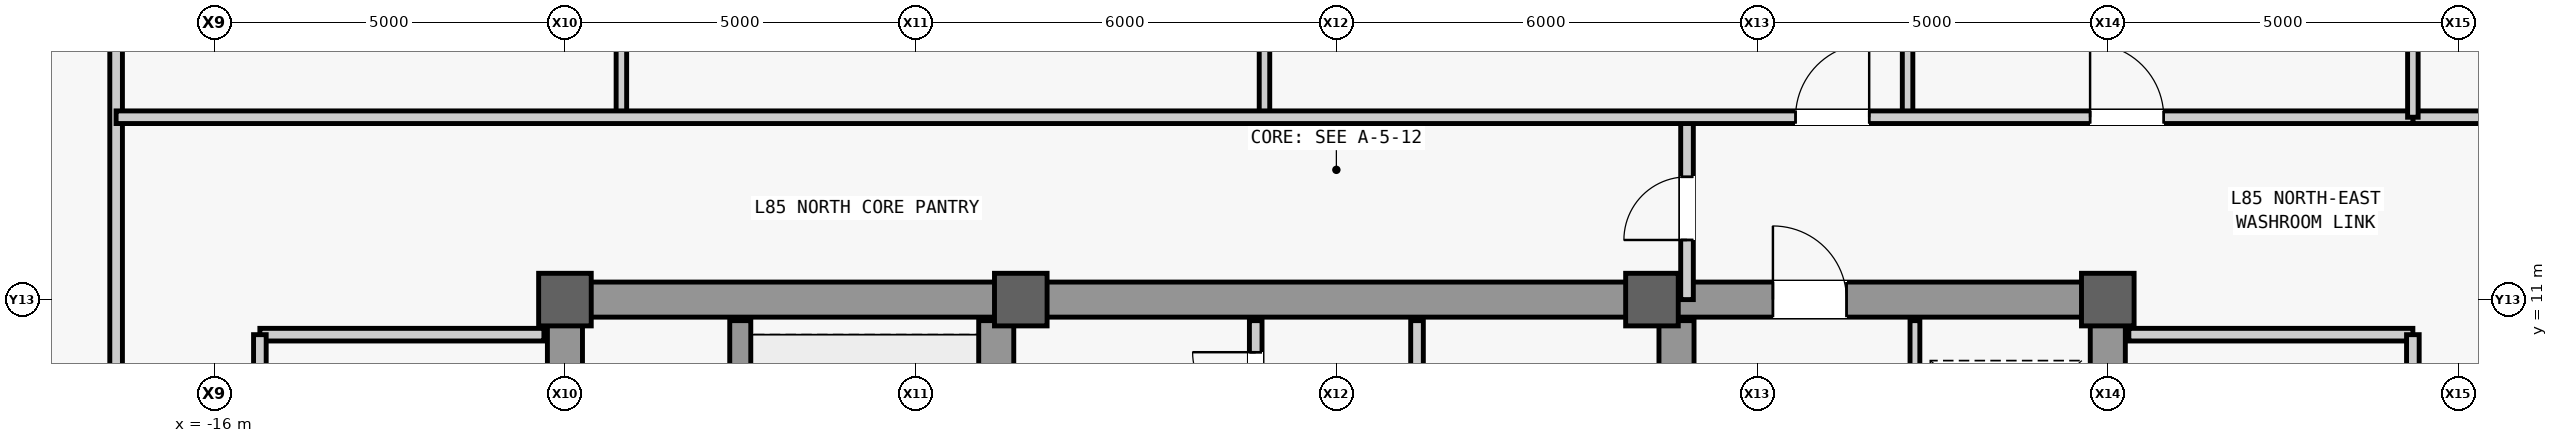
"""IFC4 building model, lengths in metres.
Left out: names, types, materials, properties, quantities, classifications, styles, units other than length and angle.
Written with IfcOpenShell. Run it as: python <this file> out.ifc"""

import sys

from ifc_helpers import new_model, si_unit, direction, frame, frame_2d, origin, origin_2d, place, context, subcontext, project, spatial, rectangle, extrude, source, transform, mapped, element, fill, save


model = new_model("IFC4")
c1 = context("Model", 3, precision=1e-05, world=origin(), true_north=direction((0.0, 1.0)))
c2 = subcontext(c1, "Body", "Model", "MODEL_VIEW")
j1 = project(units=[si_unit("LENGTHUNIT", "METRE"), si_unit("PLANEANGLEUNIT", "RADIAN")], contexts=[c1])
p1 = place(None, origin())
s1 = spatial("IfcSite", under=j1, at=p1, CompositionType="ELEMENT")
p2 = place(p1, origin())
s2 = spatial("IfcBuilding", under=s1, at=p2, CompositionType="ELEMENT")
p3 = place(p2, frame((0.0, 0.0, 358.3)))
s3 = spatial("IfcBuildingStorey", under=s2, at=p3, CompositionType="ELEMENT", Elevation=358.3)
m1 = source(origin(), c2, "Body", "SweptSolid", [
    extrude(rectangle(XDim=22.0, YDim=0.5, at=frame_2d((11.0, 0.0))), origin(), (0.0, 0.0, 1.0), 3.74),
])
p4 = place(p3, frame((-11.0, -11.0, 0.0), z_axis=(0.0, 0.0, 1.0), x_axis=(0.0, 1.0, 0.0)))
e1 = element("IfcWall", 1, at=p4, inside=s3, PredefinedType="SHEAR", context=c2, shape_type="MappedRepresentation", body=[
    mapped(m1, transform((0.0, 0.0, 0.0), scale=1.0)),
])
m2 = source(origin(), c2, "Body", "SweptSolid", [
    extrude(rectangle(XDim=1.1, YDim=2.2, at=frame_2d((0.55, 1.1))), frame((0.0, 0.26, 0.0), z_axis=(0.0, -1.0, 0.0), x_axis=(1.0, 0.0, 0.0)), (0.0, 0.0, 1.0), 0.52),
])
p5 = place(p4, frame((0.8, 0.0, 0.0)))
e2 = element("IfcOpeningElement", 2, at=p5, cuts=e1, PredefinedType="OPENING", context=c2, shape_type="MappedRepresentation", body=[
    mapped(m2, transform((0.0, 0.0, 0.0), scale=1.0)),
])
p6 = place(p4, frame((12.5, 0.0, 0.0)))
e3 = element("IfcOpeningElement", 3, at=p6, cuts=e1, PredefinedType="OPENING", context=c2, shape_type="MappedRepresentation", body=[
    mapped(m2, transform((0.0, 0.0, 0.0), scale=1.0)),
])
m3 = source(origin(), c2, "Body", "SweptSolid", [
    extrude(rectangle(XDim=0.9, YDim=2.15, at=frame_2d((0.45, 1.075))), frame((0.0, 0.26, 0.0), z_axis=(0.0, -1.0, 0.0), x_axis=(1.0, 0.0, 0.0)), (0.0, 0.0, 1.0), 0.52),
])
p7 = place(p4, frame((6.2, 0.0, 0.0)))
e4 = element("IfcOpeningElement", 4, at=p7, cuts=e1, PredefinedType="OPENING", context=c2, shape_type="MappedRepresentation", body=[
    mapped(m3, transform((0.0, 0.0, 0.0), scale=1.0)),
])
p8 = place(p4, frame((8.525, 0.0, 0.0)))
e5 = element("IfcOpeningElement", 5, at=p8, cuts=e1, PredefinedType="OPENING", context=c2, shape_type="MappedRepresentation", body=[
    mapped(m3, transform((0.0, 0.0, 0.0), scale=1.0)),
])
m4 = source(origin(), c2, "Body", "SweptSolid", [
    extrude(rectangle(XDim=1.2, YDim=2.3, at=frame_2d((0.6, 1.15))), frame((0.0, 0.26, 0.0), z_axis=(0.0, -1.0, 0.0), x_axis=(1.0, 0.0, 0.0)), (0.0, 0.0, 1.0), 0.52),
])
p9 = place(p4, frame((14.6, 0.0, 0.0)))
e6 = element("IfcOpeningElement", 6, at=p9, cuts=e1, PredefinedType="OPENING", context=c2, shape_type="MappedRepresentation", body=[
    mapped(m4, transform((0.0, 0.0, 0.0), scale=1.0)),
])
p10 = place(p4, frame((18.2, 0.0, 0.0)))
e7 = element("IfcOpeningElement", 7, at=p10, cuts=e1, PredefinedType="OPENING", context=c2, shape_type="MappedRepresentation", body=[
    mapped(m4, transform((0.0, 0.0, 0.0), scale=1.0)),
])
m5 = source(origin(), c2, "Body", "SweptSolid", [
    extrude(rectangle(XDim=1.3, YDim=2.3, at=frame_2d((0.65, 1.15))), frame((0.0, 0.26, 0.0), z_axis=(0.0, -1.0, 0.0), x_axis=(1.0, 0.0, 0.0)), (0.0, 0.0, 1.0), 0.52),
])
p11 = place(p4, frame((2.7, 0.0, 0.0)))
e8 = element("IfcOpeningElement", 8, at=p11, cuts=e1, PredefinedType="OPENING", context=c2, shape_type="MappedRepresentation", body=[
    mapped(m5, transform((0.0, 0.0, 0.0), scale=1.0)),
])
p12 = place(p3, frame((11.0, -11.0, 0.0), z_axis=(0.0, 0.0, 1.0), x_axis=(0.0, 1.0, 0.0)))
e9 = element("IfcWall", 9, at=p12, inside=s3, PredefinedType="SHEAR", context=c2, shape_type="MappedRepresentation", body=[
    mapped(m1, transform((0.0, 0.0, 0.0), scale=1.0)),
])
p13 = place(p12, frame((0.8, 0.0, 0.0)))
e10 = element("IfcOpeningElement", 10, at=p13, cuts=e9, PredefinedType="OPENING", context=c2, shape_type="MappedRepresentation", body=[
    mapped(m2, transform((0.0, 0.0, 0.0), scale=1.0)),
])
p14 = place(p12, frame((6.2, 0.0, 0.0)))
e11 = element("IfcOpeningElement", 11, at=p14, cuts=e9, PredefinedType="OPENING", context=c2, shape_type="MappedRepresentation", body=[
    mapped(m3, transform((0.0, 0.0, 0.0), scale=1.0)),
])
p15 = place(p12, frame((8.525, 0.0, 0.0)))
e12 = element("IfcOpeningElement", 12, at=p15, cuts=e9, PredefinedType="OPENING", context=c2, shape_type="MappedRepresentation", body=[
    mapped(m3, transform((0.0, 0.0, 0.0), scale=1.0)),
])
p16 = place(p12, frame((17.6, 0.0, 0.0)))
e13 = element("IfcOpeningElement", 13, at=p16, cuts=e9, PredefinedType="OPENING", context=c2, shape_type="MappedRepresentation", body=[
    mapped(m4, transform((0.0, 0.0, 0.0), scale=1.0)),
])
p17 = place(p12, frame((19.6, 0.0, 0.0)))
e14 = element("IfcOpeningElement", 14, at=p17, cuts=e9, PredefinedType="OPENING", context=c2, shape_type="MappedRepresentation", body=[
    mapped(m4, transform((0.0, 0.0, 0.0), scale=1.0)),
])
p18 = place(p12, frame((2.7, 0.0, 0.0)))
e15 = element("IfcOpeningElement", 15, at=p18, cuts=e9, PredefinedType="OPENING", context=c2, shape_type="MappedRepresentation", body=[
    mapped(m5, transform((0.0, 0.0, 0.0), scale=1.0)),
])
p19 = place(p12, frame((13.35, 0.0, 0.0)))
e16 = element("IfcOpeningElement", 16, at=p19, cuts=e9, PredefinedType="OPENING", context=c2, shape_type="MappedRepresentation", body=[
    mapped(m5, transform((0.0, 0.0, 0.0), scale=1.0)),
])
m6 = source(origin(), c2, "Body", "SweptSolid", [
    extrude(rectangle(XDim=21.4, YDim=0.5, at=frame_2d((10.7, 0.0))), origin(), (0.0, 0.0, 1.0), 3.74),
])
for number, where, z_axis, x_axis in (
    (17, (-4.85, -10.7, 0.0), (0.0, 0.0, 1.0), (0.0, 1.0, 0.0)),
    (18, (4.85, -10.7, 0.0), (0.0, 0.0, 1.0), (0.0, 1.0, 0.0)),
):
    element("IfcWall", number, at=place(p3, frame(where, z_axis=z_axis, x_axis=x_axis)), inside=s3, PredefinedType="SHEAR", context=c2, shape_type="MappedRepresentation", body=[
        mapped(m6, transform((0.0, 0.0, 0.0), scale=1.0)),
    ])
m7 = source(origin(), c2, "Body", "SweptSolid", [
    extrude(rectangle(XDim=5.9, YDim=0.5, at=frame_2d((2.95, 0.0))), origin(), (0.0, 0.0, 1.0), 3.74),
])
p20 = place(p3, frame((-10.75, 11.0, 0.0), z_axis=(0.0, 0.0, 1.0), x_axis=(1.0, 0.0, 0.0)))
e19 = element("IfcWall", 19, at=p20, inside=s3, PredefinedType="SHEAR", context=c2, shape_type="MappedRepresentation", body=[
    mapped(m7, transform((0.0, 0.0, 0.0), scale=1.0)),
])
p21 = place(p3, frame((4.85, 11.0, 0.0), z_axis=(0.0, 0.0, 1.0), x_axis=(1.0, 0.0, 0.0)))
e20 = element("IfcWall", 20, at=p21, inside=s3, PredefinedType="SHEAR", context=c2, shape_type="MappedRepresentation", body=[
    mapped(m7, transform((0.0, 0.0, 0.0), scale=1.0)),
])
m8 = source(origin(), c2, "Body", "SweptSolid", [
    extrude(rectangle(XDim=1.05, YDim=2.2, at=frame_2d((0.525, 1.1))), frame((0.0, 0.26, 0.0), z_axis=(0.0, -1.0, 0.0), x_axis=(1.0, 0.0, 0.0)), (0.0, 0.0, 1.0), 0.52),
])
p22 = place(p21, frame((1.375, 0.0, 0.0)))
e21 = element("IfcOpeningElement", 21, at=p22, cuts=e20, PredefinedType="OPENING", context=c2, shape_type="MappedRepresentation", body=[
    mapped(m8, transform((0.0, 0.0, 0.0), scale=1.0)),
])
m9 = source(origin(), c2, "Body", "SweptSolid", [
    extrude(rectangle(XDim=9.2, YDim=0.5, at=frame_2d((4.6, 0.0))), origin(), (0.0, 0.0, 1.0), 3.74),
])
p23 = place(p3, frame((-4.6, 11.0, 0.0), z_axis=(0.0, 0.0, 1.0), x_axis=(1.0, 0.0, 0.0)))
e22 = element("IfcWall", 22, at=p23, inside=s3, PredefinedType="SHEAR", context=c2, shape_type="MappedRepresentation", body=[
    mapped(m9, transform((0.0, 0.0, 0.0), scale=1.0)),
])
m10 = source(origin(), c2, "Body", "SweptSolid", [
    extrude(rectangle(XDim=0.75, YDim=0.75, at=origin_2d()), origin(), (0.0, 0.0, 1.0), 4.0),
])
for number, where, z_axis, x_axis in (
    (23, (-11.0, 11.0, 0.0), (0.0, 0.0, 1.0), (1.0, 0.0, 0.0)),
    (24, (-4.5, 11.0, 0.0), (0.0, 0.0, 1.0), (1.0, 0.0, 0.0)),
    (25, (4.5, 11.0, 0.0), (0.0, 0.0, 1.0), (1.0, 0.0, 0.0)),
    (26, (11.0, 11.0, 0.0), (0.0, 0.0, 1.0), (1.0, 0.0, 0.0)),
):
    element("IfcColumn", number, at=place(p3, frame(where, z_axis=z_axis, x_axis=x_axis)), inside=s3, PredefinedType="COLUMN", context=c2, shape_type="MappedRepresentation", body=[
        mapped(m10, transform((0.0, 0.0, 0.0), scale=1.0)),
    ])
m11 = source(origin(), c2, "Body", "SweptSolid", [
    extrude(rectangle(XDim=7.75, YDim=0.3, at=frame_2d((3.875, 0.0))), origin(), (0.0, 0.0, 1.0), 3.74),
])
p24 = place(p3, frame((-8.5, 2.95, 0.0), z_axis=(0.0, 0.0, 1.0), x_axis=(0.0, 1.0, 0.0)))
e27 = element("IfcWall", 27, at=p24, inside=s3, PredefinedType="SHEAR", context=c2, shape_type="MappedRepresentation", body=[
    mapped(m11, transform((0.0, 0.0, 0.0), scale=1.0)),
])
m12 = source(origin(), c2, "Body", "SweptSolid", [
    extrude(rectangle(XDim=9.4, YDim=0.14, at=frame_2d((4.7, 0.0))), origin(), (0.0, 0.0, 1.0), 3.74),
])
p25 = place(p3, frame((8.25, 1.3, 0.0), z_axis=(0.0, 0.0, 1.0), x_axis=(0.0, 1.0, 0.0)))
e28 = element("IfcWall", 28, at=p25, inside=s3, PredefinedType="PARTITIONING", context=c2, shape_type="MappedRepresentation", body=[
    mapped(m12, transform((0.0, 0.0, 0.0), scale=1.0)),
])
m13 = source(origin(), c2, "Body", "SweptSolid", [
    extrude(rectangle(XDim=4.05, YDim=0.18, at=frame_2d((2.025, 0.0))), origin(), (0.0, 0.0, 1.0), 3.74),
])
p26 = place(p3, frame((-15.35, 10.5, 0.0), z_axis=(0.0, 0.0, 1.0), x_axis=(1.0, 0.0, 0.0)))
e29 = element("IfcWall", 29, at=p26, inside=s3, PredefinedType="PARTITIONING", context=c2, shape_type="MappedRepresentation", body=[
    mapped(m13, transform((0.0, 0.0, 0.0), scale=1.0)),
])
m14 = source(origin(), c2, "Body", "SweptSolid", [
    extrude(rectangle(XDim=16.6, YDim=0.18, at=frame_2d((8.3, 0.0))), origin(), (0.0, 0.0, 1.0), 3.74),
])
p27 = place(p3, frame((-15.35, -6.1, 0.0), z_axis=(0.0, 0.0, 1.0), x_axis=(0.0, 1.0, 0.0)))
e30 = element("IfcWall", 30, at=p27, inside=s3, PredefinedType="PARTITIONING", context=c2, shape_type="MappedRepresentation", body=[
    mapped(m14, transform((0.0, 0.0, 0.0), scale=1.0)),
])
m15 = source(origin(), c2, "Body", "SweptSolid", [
    extrude(rectangle(XDim=1.8, YDim=2.25, at=frame_2d((0.9, 1.125))), frame((0.0, 0.1, 0.0), z_axis=(0.0, -1.0, 0.0), x_axis=(1.0, 0.0, 0.0)), (0.0, 0.0, 1.0), 0.2),
])
p28 = place(p27, frame((2.7, 0.0, 0.0)))
e31 = element("IfcOpeningElement", 31, at=p28, cuts=e30, PredefinedType="OPENING", context=c2, shape_type="MappedRepresentation", body=[
    mapped(m15, transform((0.0, 0.0, 0.0), scale=1.0)),
])
p29 = place(p27, frame((11.0, 0.0, 0.0)))
e32 = element("IfcOpeningElement", 32, at=p29, cuts=e30, PredefinedType="OPENING", context=c2, shape_type="MappedRepresentation", body=[
    mapped(m15, transform((0.0, 0.0, 0.0), scale=1.0)),
])
p30 = place(p3, frame((11.3, 10.5, 0.0), z_axis=(0.0, 0.0, 1.0), x_axis=(1.0, 0.0, 0.0)))
e33 = element("IfcWall", 33, at=p30, inside=s3, PredefinedType="PARTITIONING", context=c2, shape_type="MappedRepresentation", body=[
    mapped(m13, transform((0.0, 0.0, 0.0), scale=1.0)),
])
p31 = place(p3, frame((15.35, -6.1, 0.0), z_axis=(0.0, 0.0, 1.0), x_axis=(0.0, 1.0, 0.0)))
e34 = element("IfcWall", 34, at=p31, inside=s3, PredefinedType="PARTITIONING", context=c2, shape_type="MappedRepresentation", body=[
    mapped(m14, transform((0.0, 0.0, 0.0), scale=1.0)),
])
p32 = place(p31, frame((2.7, 0.0, 0.0)))
e35 = element("IfcOpeningElement", 35, at=p32, cuts=e34, PredefinedType="OPENING", context=c2, shape_type="MappedRepresentation", body=[
    mapped(m15, transform((0.0, 0.0, 0.0), scale=1.0)),
])
p33 = place(p31, frame((13.0, 0.0, 0.0)))
e36 = element("IfcOpeningElement", 36, at=p33, cuts=e34, PredefinedType="OPENING", context=c2, shape_type="MappedRepresentation", body=[
    mapped(m15, transform((0.0, 0.0, 0.0), scale=1.0)),
])
m16 = source(origin(), c2, "Body", "SweptSolid", [
    extrude(rectangle(XDim=5.4, YDim=0.18, at=frame_2d((2.7, 0.0))), origin(), (0.0, 0.0, 1.0), 3.74),
])
p34 = place(p3, frame((-1.15, 5.3, 0.0), z_axis=(0.0, 0.0, 1.0), x_axis=(0.0, 1.0, 0.0)))
e37 = element("IfcWall", 37, at=p34, inside=s3, PredefinedType="PARTITIONING", context=c2, shape_type="MappedRepresentation", body=[
    mapped(m16, transform((0.0, 0.0, 0.0), scale=1.0)),
])
m17 = source(origin(), c2, "Body", "SweptSolid", [
    extrude(rectangle(XDim=0.9, YDim=2.15, at=frame_2d((0.45, 1.075))), frame((0.0, 0.1, 0.0), z_axis=(0.0, -1.0, 0.0), x_axis=(1.0, 0.0, 0.0)), (0.0, 0.0, 1.0), 0.2),
])
p35 = place(p34, frame((0.45, 0.0, 0.0)))
e38 = element("IfcOpeningElement", 38, at=p35, cuts=e37, PredefinedType="OPENING", context=c2, shape_type="MappedRepresentation", body=[
    mapped(m17, transform((0.0, 0.0, 0.0), scale=1.0)),
])
p36 = place(p34, frame((2.25, 0.0, 0.0)))
e39 = element("IfcOpeningElement", 39, at=p36, cuts=e37, PredefinedType="OPENING", context=c2, shape_type="MappedRepresentation", body=[
    mapped(m17, transform((0.0, 0.0, 0.0), scale=1.0)),
])
p37 = place(p34, frame((4.05, 0.0, 0.0)))
e40 = element("IfcOpeningElement", 40, at=p37, cuts=e37, PredefinedType="OPENING", context=c2, shape_type="MappedRepresentation", body=[
    mapped(m17, transform((0.0, 0.0, 0.0), scale=1.0)),
])
p38 = place(p3, frame((1.15, 5.3, 0.0), z_axis=(0.0, 0.0, 1.0), x_axis=(0.0, 1.0, 0.0)))
e41 = element("IfcWall", 41, at=p38, inside=s3, PredefinedType="PARTITIONING", context=c2, shape_type="MappedRepresentation", body=[
    mapped(m16, transform((0.0, 0.0, 0.0), scale=1.0)),
])
p39 = place(p38, frame((0.95, 0.0, 0.0)))
e42 = element("IfcOpeningElement", 42, at=p39, cuts=e41, PredefinedType="OPENING", context=c2, shape_type="MappedRepresentation", body=[
    mapped(m17, transform((0.0, 0.0, 0.0), scale=1.0)),
])
p40 = place(p38, frame((3.65, 0.0, 0.0)))
e43 = element("IfcOpeningElement", 43, at=p40, cuts=e41, PredefinedType="OPENING", context=c2, shape_type="MappedRepresentation", body=[
    mapped(m17, transform((0.0, 0.0, 0.0), scale=1.0)),
])
m18 = source(origin(), c2, "Body", "SweptSolid", [
    extrude(rectangle(XDim=8.4, YDim=0.18, at=frame_2d((4.2, 0.0))), origin(), (0.0, 0.0, 1.0), 3.74),
])
p41 = place(p3, frame((-17.4, 7.2, 0.0), z_axis=(0.0, 0.0, 1.0), x_axis=(0.0, 1.0, 0.0)))
e44 = element("IfcWall", 44, at=p41, inside=s3, PredefinedType="PARTITIONING", context=c2, shape_type="MappedRepresentation", body=[
    mapped(m18, transform((0.0, 0.0, 0.0), scale=1.0)),
])
m19 = source(origin(), c2, "Body", "SweptSolid", [
    extrude(rectangle(XDim=2.6, YDim=0.18, at=frame_2d((1.3, 0.0))), origin(), (0.0, 0.0, 1.0), 3.74),
])
p42 = place(p3, frame((5.0, 11.0, 0.0), z_axis=(0.0, 0.0, 1.0), x_axis=(0.0, 1.0, 0.0)))
e45 = element("IfcWall", 45, at=p42, inside=s3, PredefinedType="PARTITIONING", context=c2, shape_type="MappedRepresentation", body=[
    mapped(m19, transform((0.0, 0.0, 0.0), scale=1.0)),
])
p43 = place(p42, frame((0.85, 0.0, 0.0)))
e46 = element("IfcOpeningElement", 46, at=p43, cuts=e45, PredefinedType="OPENING", context=c2, shape_type="MappedRepresentation", body=[
    mapped(m17, transform((0.0, 0.0, 0.0), scale=1.0)),
])
m20 = source(origin(), c2, "Body", "SweptSolid", [
    extrude(rectangle(XDim=2.4, YDim=0.18, at=frame_2d((1.2, 0.0))), origin(), (0.0, 0.0, 1.0), 3.74),
])
p44 = place(p3, frame((15.35, 13.6, 0.0), z_axis=(0.0, 0.0, 1.0), x_axis=(1.0, 0.0, 0.0)))
e47 = element("IfcWall", 47, at=p44, inside=s3, PredefinedType="PARTITIONING", context=c2, shape_type="MappedRepresentation", body=[
    mapped(m20, transform((0.0, 0.0, 0.0), scale=1.0)),
])
m21 = source(origin(), c2, "Body", "SweptSolid", [
    extrude(rectangle(XDim=12.4, YDim=0.15, at=frame_2d((6.2, 0.0))), origin(), (0.0, 0.0, 1.0), 3.74),
])
p45 = place(p3, frame((-10.195, 13.6, 0.0), z_axis=(0.0, 0.0, 1.0), x_axis=(0.0, 1.0, 0.0)))
e48 = element("IfcWall", 48, at=p45, inside=s3, PredefinedType="PARTITIONING", context=c2, shape_type="MappedRepresentation", body=[
    mapped(m21, transform((0.0, 0.0, 0.0), scale=1.0)),
])
m22 = source(origin(), c2, "Body", "SweptSolid", [
    extrude(rectangle(XDim=0.95, YDim=2.15, at=frame_2d((0.475, 1.075))), frame((0.0, 0.085, 0.0), z_axis=(0.0, -1.0, 0.0), x_axis=(1.0, 0.0, 0.0)), (0.0, 0.0, 1.0), 0.17),
])
p46 = place(p45, frame((2.501, 0.0, 0.0)))
e49 = element("IfcOpeningElement", 49, at=p46, cuts=e48, PredefinedType="OPENING", context=c2, shape_type="MappedRepresentation", body=[
    mapped(m22, transform((0.0, 0.0, 0.0), scale=1.0)),
])
p47 = place(p3, frame((-1.025, 13.6, 0.0), z_axis=(0.0, 0.0, 1.0), x_axis=(0.0, 1.0, 0.0)))
e50 = element("IfcWall", 50, at=p47, inside=s3, PredefinedType="PARTITIONING", context=c2, shape_type="MappedRepresentation", body=[
    mapped(m21, transform((0.0, 0.0, 0.0), scale=1.0)),
])
p48 = place(p47, frame((2.501, 0.0, 0.0)))
e51 = element("IfcOpeningElement", 51, at=p48, cuts=e50, PredefinedType="OPENING", context=c2, shape_type="MappedRepresentation", body=[
    mapped(m22, transform((0.0, 0.0, 0.0), scale=1.0)),
])
p49 = place(p3, frame((8.145, 13.6, 0.0), z_axis=(0.0, 0.0, 1.0), x_axis=(0.0, 1.0, 0.0)))
e52 = element("IfcWall", 52, at=p49, inside=s3, PredefinedType="PARTITIONING", context=c2, shape_type="MappedRepresentation", body=[
    mapped(m21, transform((0.0, 0.0, 0.0), scale=1.0)),
])
m23 = source(origin(), c2, "Body", "SweptSolid", [
    extrude(rectangle(XDim=32.75, YDim=0.18, at=frame_2d((16.375, 0.0))), origin(), (0.0, 0.0, 1.0), 3.74),
])
p50 = place(p3, frame((-17.4, 13.6, 0.0), z_axis=(0.0, 0.0, 1.0), x_axis=(1.0, 0.0, 0.0)))
e53 = element("IfcWall", 53, at=p50, inside=s3, PredefinedType="PARTITIONING", context=c2, shape_type="MappedRepresentation", body=[
    mapped(m23, transform((0.0, 0.0, 0.0), scale=1.0)),
])
m24 = source(origin(), c2, "Body", "SweptSolid", [
    extrude(rectangle(XDim=1.05, YDim=2.2, at=frame_2d((0.525, 1.1))), frame((0.0, 0.1, 0.0), z_axis=(0.0, -1.0, 0.0), x_axis=(1.0, 0.0, 0.0)), (0.0, 0.0, 1.0), 0.2),
])
p51 = place(p50, frame((23.948, 0.0, 0.0)))
e54 = element("IfcOpeningElement", 54, at=p51, cuts=e53, PredefinedType="OPENING", context=c2, shape_type="MappedRepresentation", body=[
    mapped(m24, transform((0.0, 0.0, 0.0), scale=1.0)),
])
p52 = place(p50, frame((28.147, 0.0, 0.0)))
e55 = element("IfcOpeningElement", 55, at=p52, cuts=e53, PredefinedType="OPENING", context=c2, shape_type="MappedRepresentation", body=[
    mapped(m24, transform((0.0, 0.0, 0.0), scale=1.0)),
])
p53 = place(p3, frame((15.35, 13.6, 0.0), z_axis=(0.0, 0.0, 1.0), x_axis=(0.0, 1.0, 0.0)))
e56 = element("IfcWall", 56, at=p53, inside=s3, PredefinedType="PARTITIONING", context=c2, shape_type="MappedRepresentation", body=[
    mapped(m21, transform((0.0, 0.0, 0.0), scale=1.0)),
])
m25 = source(origin(), c2, "Body", "SweptSolid", [
    extrude(rectangle(XDim=1.05, YDim=2.2, at=frame_2d((0.525, 1.1))), frame((0.0, 0.025, 0.0), z_axis=(0.0, -1.0, 0.0), x_axis=(1.0, 0.0, 0.0)), (0.0, 0.0, 1.0), 0.05),
])
p54 = place(p22, origin())
e57 = element("IfcDoor", 57, at=p54, inside=s3, OperationType="SINGLE_SWING_LEFT", PredefinedType="DOOR", context=c2, shape_type="MappedRepresentation", body=[
    mapped(m25, transform((0.0, 0.0, 0.0), scale=1.0)),
])
fill(e21, e57)
m26 = source(origin(), c2, "Body", "SweptSolid", [
    extrude(rectangle(XDim=0.9, YDim=2.15, at=frame_2d((0.45, 1.075))), frame((0.0, 0.025, 0.0), z_axis=(0.0, -1.0, 0.0), x_axis=(1.0, 0.0, 0.0)), (0.0, 0.0, 1.0), 0.05),
])
p55 = place(p37, origin())
e58 = element("IfcDoor", 58, at=p55, inside=s3, OperationType="SINGLE_SWING_RIGHT", PredefinedType="DOOR", context=c2, shape_type="MappedRepresentation", body=[
    mapped(m26, transform((0.0, 0.0, 0.0), scale=1.0)),
])
fill(e40, e58)
p56 = place(p43, origin())
e59 = element("IfcDoor", 59, at=p56, inside=s3, OperationType="SINGLE_SWING_LEFT", PredefinedType="DOOR", context=c2, shape_type="MappedRepresentation", body=[
    mapped(m26, transform((0.0, 0.0, 0.0), scale=1.0)),
])
fill(e46, e59)
p57 = place(p51, origin())
e60 = element("IfcDoor", 60, at=p57, inside=s3, OperationType="SINGLE_SWING_RIGHT", PredefinedType="DOOR", context=c2, shape_type="MappedRepresentation", body=[
    mapped(m25, transform((0.0, 0.0, 0.0), scale=1.0)),
])
fill(e54, e60)
p58 = place(p52, origin())
e61 = element("IfcDoor", 61, at=p58, inside=s3, OperationType="SINGLE_SWING_LEFT", PredefinedType="DOOR", context=c2, shape_type="MappedRepresentation", body=[
    mapped(m25, transform((0.0, 0.0, 0.0), scale=1.0)),
])
fill(e55, e61)
save(model, sys.argv[1])
